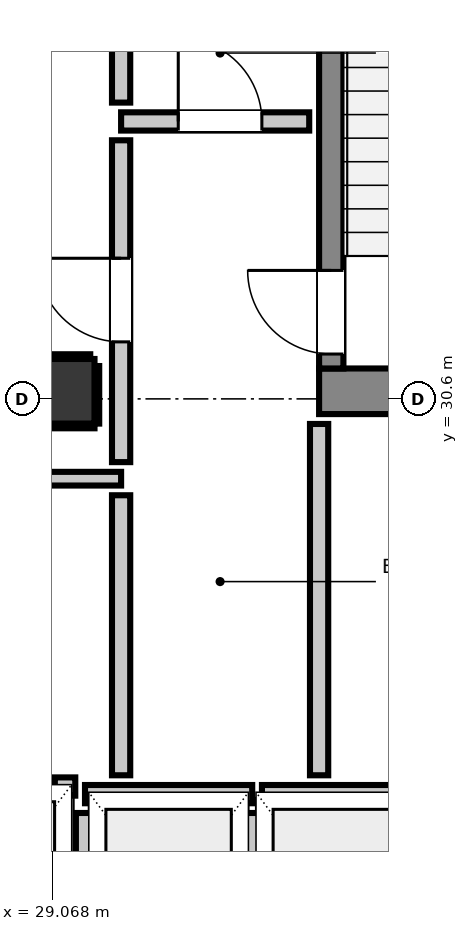
"""IFC4 building model, lengths in metres.
Left out: names, types, materials, properties, quantities, classifications, styles, units other than length and angle.
Written with IfcOpenShell. Run it as: python <this file> out.ifc"""

import sys

from ifc_helpers import new_model, si_unit, direction, frame, frame_2d, origin, origin_2d, place, context, subcontext, project, spatial, rectangle, extrude, element, fill, save


model = new_model("IFC4")
c1 = context("Model", 3, precision=1e-05, world=origin(), true_north=direction((0.0, 1.0)))
c2 = subcontext(c1, "Body", "Model", "MODEL_VIEW")
j1 = project(units=[si_unit("LENGTHUNIT", "METRE"), si_unit("PLANEANGLEUNIT", "RADIAN")], contexts=[c1])
p1 = place(None, origin())
s1 = spatial("IfcSite", under=j1, at=p1, CompositionType="ELEMENT")
p2 = place(p1, origin())
s2 = spatial("IfcBuilding", under=s1, at=p2, CompositionType="ELEMENT")
p3 = place(p2, frame((0.0, 0.0, 265.56)))
s3 = spatial("IfcBuildingStorey", under=s2, at=p3, CompositionType="ELEMENT", Elevation=265.56)
p4 = place(p3, frame((32.58, 30.7, 0.0), z_axis=(0.0, 0.0, 1.0), x_axis=(1.0, 0.0, 0.0)))
e1 = element("IfcWall", 1, at=p4, inside=s3, PredefinedType="SHEAR", context=c2, shape_type="SweptSolid", body=[
    extrude(rectangle(XDim=3.54, YDim=0.6, at=frame_2d((1.77, 0.0))), origin(), (0.0, 0.0, 1.0), 3.32),
])
p5 = place(p3, frame((32.74, 31.0, 0.0), z_axis=(0.0, 0.0, 1.0), x_axis=(0.0, 1.0, 0.0)))
e2 = element("IfcWall", 2, at=p5, inside=s3, PredefinedType="SHEAR", context=c2, shape_type="SweptSolid", body=[
    extrude(rectangle(XDim=7.8, YDim=0.32, at=frame_2d((3.9, 0.0))), origin(), (0.0, 0.0, 1.0), 3.32),
])
p6 = place(p5, frame((0.19, 0.0, 0.0)))
e3 = element("IfcOpeningElement", 3, at=p6, cuts=e2, PredefinedType="OPENING", context=c2, shape_type="SweptSolid", body=[
    extrude(rectangle(XDim=1.1, YDim=2.15, at=frame_2d((0.55, 1.075))), frame((0.0, 0.17, 0.0), z_axis=(0.0, -1.0, 0.0), x_axis=(1.0, 0.0, 0.0)), (0.0, 0.0, 1.0), 0.34),
])
p7 = place(p3, frame((29.2, 30.7, 0.0), z_axis=(0.0, 0.0, 1.0), x_axis=(1.0, 0.0, 0.0)))
e4 = element("IfcColumn", 4, at=p7, inside=s3, PredefinedType="COLUMN", context=c2, shape_type="SweptSolid", body=[
    extrude(rectangle(XDim=0.85, YDim=0.85, at=origin_2d()), origin(), (0.0, 0.0, 1.0), 3.32),
])
p8 = place(p3, frame((29.5, 25.4, 0.0), z_axis=(0.0, 0.0, 1.0), x_axis=(1.0, 0.0, 0.0)))
e5 = element("IfcWall", 5, at=p8, inside=s3, PredefinedType="PARTITIONING", context=c2, shape_type="SweptSolid", body=[
    extrude(rectangle(XDim=2.2, YDim=0.24, at=frame_2d((1.1, 0.0))), origin(), (0.0, 0.0, 1.0), 3.1),
])
p9 = place(p3, frame((29.5, 22.848, 0.0), z_axis=(0.0, 0.0, 1.0), x_axis=(0.0, 1.0, 0.0)))
e6 = element("IfcWall", 6, at=p9, inside=s3, PredefinedType="PARTITIONING", context=c2, shape_type="SweptSolid", body=[
    extrude(rectangle(XDim=2.304, YDim=0.24, at=frame_2d((1.152, 0.0))), origin(), (0.0, 0.0, 1.0), 2.335),
])
p10 = place(p3, frame((31.7, 22.848, 0.0), z_axis=(0.0, 0.0, 1.0), x_axis=(0.0, 1.0, 0.0)))
e7 = element("IfcWall", 7, at=p10, inside=s3, PredefinedType="PARTITIONING", context=c2, shape_type="SweptSolid", body=[
    extrude(rectangle(XDim=2.304, YDim=0.24, at=frame_2d((1.152, 0.0))), origin(), (0.0, 0.0, 1.0), 3.1),
])
p11 = place(p3, frame((31.828, 25.4, 0.0), z_axis=(0.0, 0.0, 1.0), x_axis=(1.0, 0.0, 0.0)))
e8 = element("IfcWall", 8, at=p11, inside=s3, PredefinedType="PARTITIONING", context=c2, shape_type="SweptSolid", body=[
    extrude(rectangle(XDim=2.072, YDim=0.24, at=frame_2d((1.036, 0.0))), origin(), (0.0, 0.0, 1.0), 3.1),
])
p12 = place(p3, frame((29.103, 25.5, 0.0), z_axis=(0.0, 0.0, 1.0), x_axis=(1.0, 0.0, 0.0)))
e9 = element("IfcWall", 9, at=p12, inside=s3, PredefinedType="PARTITIONING", context=c2, shape_type="SweptSolid", body=[
    extrude(rectangle(XDim=0.269, YDim=0.24, at=frame_2d((0.135, 0.0))), origin(), (0.0, 0.0, 1.0), 3.1),
])
p13 = place(p3, frame((29.975, 34.25, 0.0), z_axis=(0.0, 0.0, 1.0), x_axis=(1.0, 0.0, 0.0)))
e10 = element("IfcWall", 10, at=p13, inside=s3, PredefinedType="PARTITIONING", context=c2, shape_type="SweptSolid", body=[
    extrude(rectangle(XDim=2.475, YDim=0.24, at=frame_2d((1.237, 0.0))), origin(), (0.0, 0.0, 1.0), 3.1),
])
p14 = place(p13, frame((0.752, 0.0, 0.0)))
e11 = element("IfcOpeningElement", 11, at=p14, cuts=e10, PredefinedType="OPENING", context=c2, shape_type="SweptSolid", body=[
    extrude(rectangle(XDim=1.1, YDim=2.15, at=frame_2d((0.55, 1.075))), frame((0.0, 0.13, 0.0), z_axis=(0.0, -1.0, 0.0), x_axis=(1.0, 0.0, 0.0)), (0.0, 0.0, 1.0), 0.26),
])
p15 = place(p3, frame((28.593, 29.55, 0.0), z_axis=(0.0, 0.0, 1.0), x_axis=(1.0, 0.0, 0.0)))
e12 = element("IfcWall", 12, at=p15, inside=s3, PredefinedType="PARTITIONING", context=c2, shape_type="SweptSolid", body=[
    extrude(rectangle(XDim=1.382, YDim=0.18, at=frame_2d((0.691, 0.0))), origin(), (0.0, 0.0, 1.0), 3.1),
])
p16 = place(p3, frame((29.975, 25.648, 0.0), z_axis=(0.0, 0.0, 1.0), x_axis=(0.0, 1.0, 0.0)))
e13 = element("IfcWall", 13, at=p16, inside=s3, PredefinedType="PARTITIONING", context=c2, shape_type="SweptSolid", body=[
    extrude(rectangle(XDim=3.684, YDim=0.24, at=frame_2d((1.842, 0.0))), origin(), (0.0, 0.0, 1.0), 3.1),
])
p17 = place(p3, frame((29.975, 29.768, 0.0), z_axis=(0.0, 0.0, 1.0), x_axis=(0.0, 1.0, 0.0)))
e14 = element("IfcWall", 14, at=p17, inside=s3, PredefinedType="PARTITIONING", context=c2, shape_type="SweptSolid", body=[
    extrude(rectangle(XDim=4.234, YDim=0.24, at=frame_2d((2.117, 0.0))), origin(), (0.0, 0.0, 1.0), 3.1),
])
p18 = place(p17, frame((1.582, 0.0, 0.0)))
e15 = element("IfcOpeningElement", 15, at=p18, cuts=e14, PredefinedType="OPENING", context=c2, shape_type="SweptSolid", body=[
    extrude(rectangle(XDim=1.1, YDim=2.15, at=frame_2d((0.55, 1.075))), frame((0.0, 0.13, 0.0), z_axis=(0.0, -1.0, 0.0), x_axis=(1.0, 0.0, 0.0)), (0.0, 0.0, 1.0), 0.26),
])
p19 = place(p3, frame((29.975, 34.498, 0.0), z_axis=(0.0, 0.0, 1.0), x_axis=(0.0, 1.0, 0.0)))
e16 = element("IfcWall", 16, at=p19, inside=s3, PredefinedType="PARTITIONING", context=c2, shape_type="SweptSolid", body=[
    extrude(rectangle(XDim=0.924, YDim=0.24, at=frame_2d((0.462, 0.0))), origin(), (0.0, 0.0, 1.0), 3.1),
])
p20 = place(p3, frame((32.58, 25.648, 0.0), z_axis=(0.0, 0.0, 1.0), x_axis=(0.0, 1.0, 0.0)))
e17 = element("IfcWall", 17, at=p20, inside=s3, PredefinedType="PARTITIONING", context=c2, shape_type="SweptSolid", body=[
    extrude(rectangle(XDim=4.622, YDim=0.24, at=frame_2d((2.311, 0.0))), origin(), (0.0, 0.0, 1.0), 3.1),
])
p21 = place(p3, frame((28.775, 30.243, 0.0), z_axis=(0.0, 0.0, 1.0), x_axis=(1.0, 0.0, 0.0)))
e18 = element("IfcWall", 18, at=p21, inside=s3, PredefinedType="PARTITIONING", context=c2, shape_type="SweptSolid", body=[
    extrude(rectangle(XDim=0.85, YDim=0.06, at=frame_2d((0.425, 0.0))), origin(), (0.0, 0.0, 1.0), 1.45),
])
p22 = place(p3, frame((28.775, 31.157, 0.0), z_axis=(0.0, 0.0, 1.0), x_axis=(1.0, 0.0, 0.0)))
e19 = element("IfcWall", 19, at=p22, inside=s3, PredefinedType="PARTITIONING", context=c2, shape_type="SweptSolid", body=[
    extrude(rectangle(XDim=0.794, YDim=0.06, at=frame_2d((0.397, 0.0))), origin(), (0.0, 0.0, 1.0), 1.45),
])
p23 = place(p3, frame((29.657, 30.275, 0.0), z_axis=(0.0, 0.0, 1.0), x_axis=(0.0, 1.0, 0.0)))
e20 = element("IfcWall", 20, at=p23, inside=s3, PredefinedType="PARTITIONING", context=c2, shape_type="SweptSolid", body=[
    extrude(rectangle(XDim=0.757, YDim=0.06, at=frame_2d((0.378, 0.0))), origin(), (0.0, 0.0, 1.0), 1.45),
])
p24 = place(p6, origin())
e21 = element("IfcDoor", 21, at=p24, inside=s3, OperationType="SINGLE_SWING_RIGHT", PredefinedType="DOOR", context=c2, shape_type="SweptSolid", body=[
    extrude(rectangle(XDim=1.1, YDim=2.15, at=frame_2d((0.55, 1.075))), frame((0.0, 0.025, 0.0), z_axis=(0.0, -1.0, 0.0), x_axis=(1.0, 0.0, 0.0)), (0.0, 0.0, 1.0), 0.05),
])
fill(e3, e21)
p25 = place(p18, origin())
e22 = element("IfcDoor", 22, at=p25, inside=s3, OperationType="SINGLE_SWING_RIGHT", PredefinedType="DOOR", context=c2, shape_type="SweptSolid", body=[
    extrude(rectangle(XDim=1.1, YDim=2.15, at=frame_2d((0.55, 1.075))), frame((0.0, 0.025, 0.0), z_axis=(0.0, -1.0, 0.0), x_axis=(1.0, 0.0, 0.0)), (0.0, 0.0, 1.0), 0.05),
])
fill(e15, e22)
p26 = place(p14, origin())
e23 = element("IfcDoor", 23, at=p26, inside=s3, OperationType="SINGLE_SWING_LEFT", PredefinedType="DOOR", context=c2, shape_type="SweptSolid", body=[
    extrude(rectangle(XDim=1.1, YDim=2.15, at=frame_2d((0.55, 1.075))), frame((0.0, 0.025, 0.0), z_axis=(0.0, -1.0, 0.0), x_axis=(1.0, 0.0, 0.0)), (0.0, 0.0, 1.0), 0.05),
])
fill(e11, e23)
save(model, sys.argv[1])
